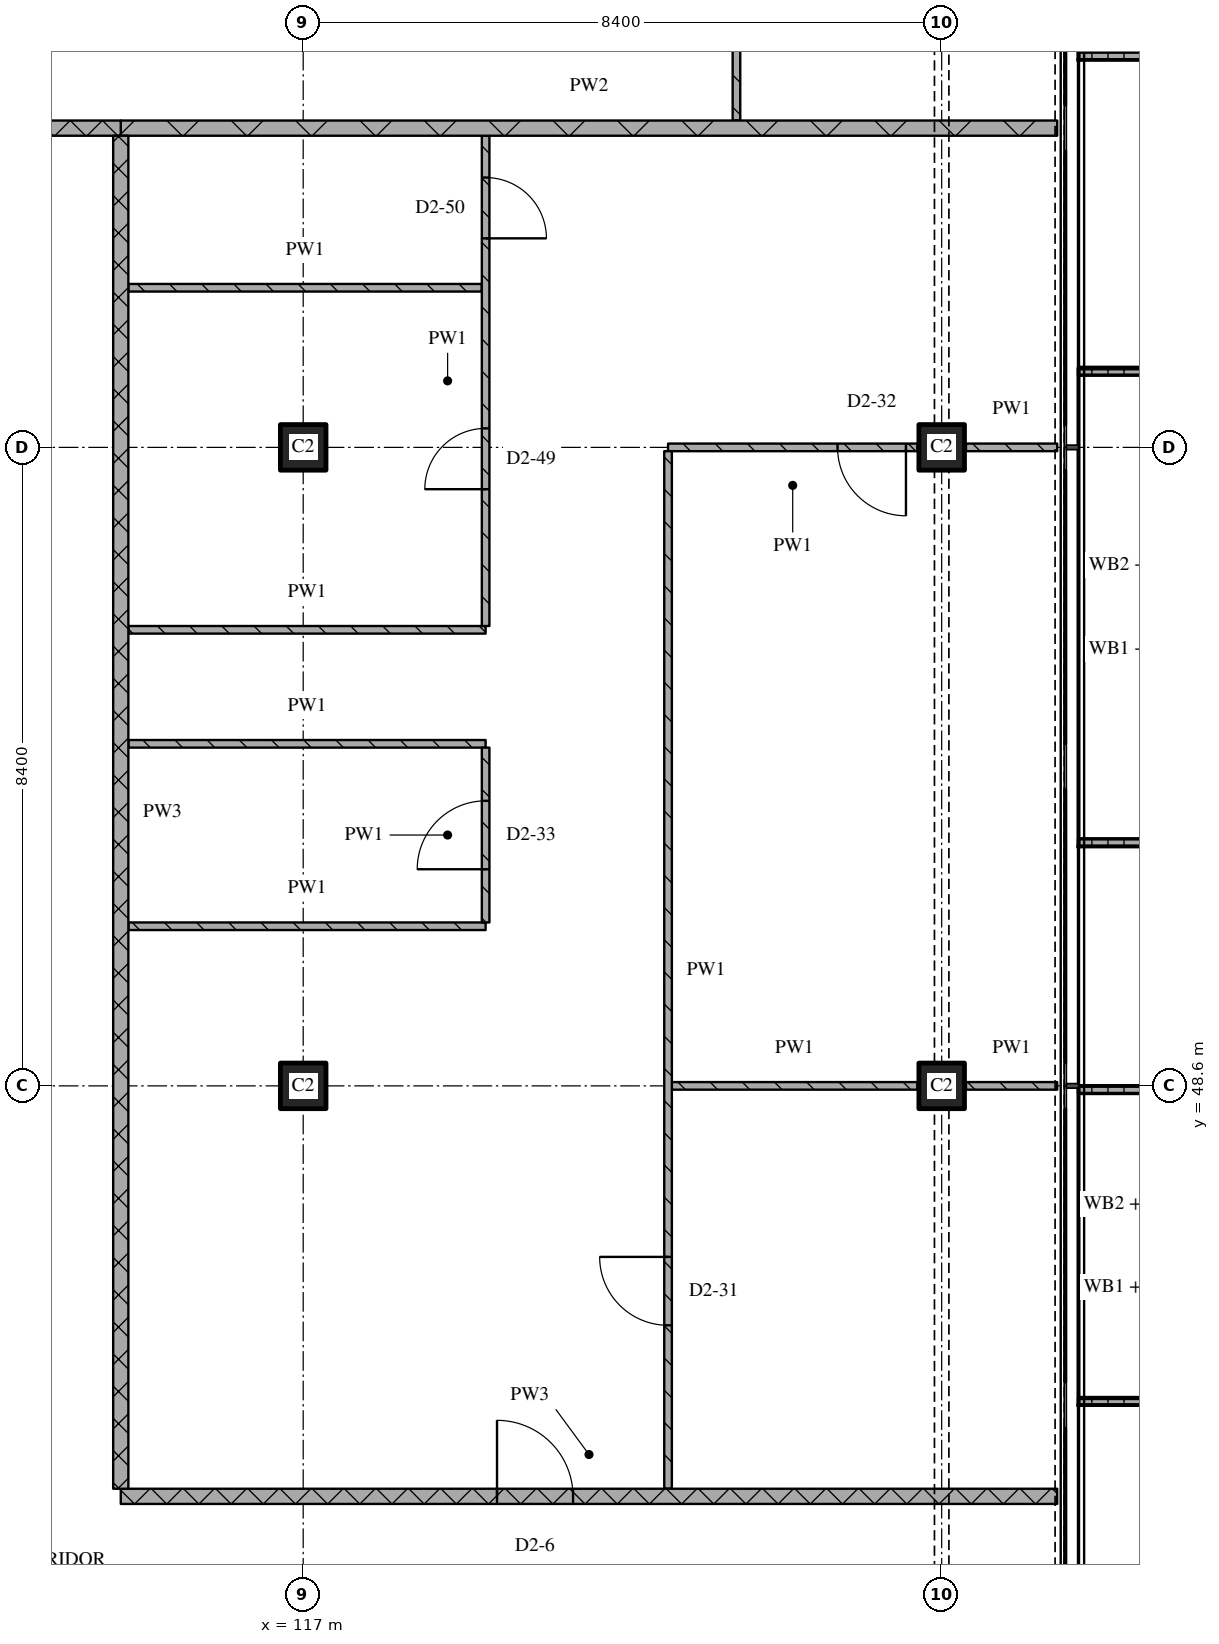
"""IFC4 building model, lengths in metres.
Left out: names, types, materials, properties, quantities, classifications, styles, units other than length and angle.
Written with IfcOpenShell. Run it as: python <this file> out.ifc"""

import sys

from ifc_helpers import new_model, si_unit, direction, frame, frame_2d, origin, origin_2d, place, context, subcontext, project, spatial, polyline, rectangle, outline, extrude, element, fill, save


model = new_model("IFC4")
c1 = context("Model", 3, precision=1e-05, world=origin(), true_north=direction((0.0, 1.0)))
c2 = subcontext(c1, "Body", "Model", "MODEL_VIEW")
j1 = project(units=[si_unit("LENGTHUNIT", "METRE"), si_unit("PLANEANGLEUNIT", "RADIAN")], contexts=[c1])
p1 = place(None, origin())
s1 = spatial("IfcSite", under=j1, at=p1, CompositionType="ELEMENT")
p2 = place(p1, origin())
s2 = spatial("IfcBuilding", under=s1, at=p2, CompositionType="ELEMENT")
p3 = place(p2, frame((0.0, 0.0, 216.3)))
s3 = spatial("IfcBuildingStorey", under=s2, at=p3, CompositionType="ELEMENT", Elevation=216.3)
for number, where, z_axis, x_axis in (
    (1, (117.0, 48.6, 0.0), (0.0, 0.0, 1.0), (1.0, 0.0, 0.0)),
    (2, (117.0, 57.0, 0.0), (0.0, 0.0, 1.0), (1.0, 0.0, 0.0)),
    (3, (125.4, 48.6, 0.0), (0.0, 0.0, 1.0), (1.0, 0.0, 0.0)),
    (4, (125.4, 57.0, 0.0), (0.0, 0.0, 1.0), (1.0, 0.0, 0.0)),
):
    element("IfcColumn", number, at=place(p3, frame(where, z_axis=z_axis, x_axis=x_axis)), inside=s3, PredefinedType="COLUMN", context=c2, shape_type="SweptSolid", body=[
        extrude(rectangle(XDim=0.6, YDim=0.6, at=origin_2d()), origin(), (0.0, 0.0, 1.0), 3.6),
    ])
p4 = place(p3, origin())
e5 = element("IfcWall", 5, at=p4, inside=s3, PredefinedType="SOLIDWALL", context=c2, shape_type="SweptSolid", body=[
    extrude(outline(polyline([(127.2, 44.4), (127.2, 44.5), (128.833, 44.5), (128.833, 48.5), (127.2, 48.5), (127.2, 48.6), (128.933, 48.6), (128.933, 44.4), (127.2, 44.4)])), origin(), (0.0, 0.0, 1.0), 1.0),
])
p5 = place(p3, origin())
e6 = element("IfcWall", 6, at=p5, inside=s3, PredefinedType="SOLIDWALL", context=c2, shape_type="SweptSolid", body=[
    extrude(outline(polyline([(127.2, 51.75), (127.2, 51.85), (128.967, 51.85), (128.967, 57.95), (127.2, 57.95), (127.2, 58.05), (129.067, 58.05), (129.067, 51.75), (127.2, 51.75)])), origin(), (0.0, 0.0, 1.0), 1.0),
])
p6 = place(p3, origin())
e7 = element("IfcWall", 7, at=p6, inside=s3, PredefinedType="SOLIDWALL", context=c2, shape_type="SweptSolid", body=[
    extrude(outline(polyline([(127.2, 62.1), (127.2, 62.2), (128.7, 62.2), (128.7, 64.4), (127.2, 64.4), (127.2, 64.5), (128.8, 64.5), (128.8, 62.1), (127.2, 62.1)])), origin(), (0.0, 0.0, 1.0), 1.0),
])
p7 = place(p3, frame((114.6, 43.2, 0.0), z_axis=(0.0, 0.0, 1.0), x_axis=(1.0, 0.0, 0.0)))
e8 = element("IfcWall", 8, at=p7, inside=s3, PredefinedType="PARTITIONING", context=c2, shape_type="SweptSolid", body=[
    extrude(rectangle(XDim=12.32, YDim=0.2, at=frame_2d((6.16, 0.0))), origin(), (0.0, 0.0, 1.0), 3.32),
])
p8 = place(p7, frame((4.95, 0.0, 0.0)))
e9 = element("IfcOpeningElement", 9, at=p8, cuts=e8, PredefinedType="OPENING", context=c2, shape_type="SweptSolid", body=[
    extrude(rectangle(XDim=1.0, YDim=2.1, at=frame_2d((0.5, 1.05))), frame((0.0, 0.11, 0.0), z_axis=(0.0, -1.0, 0.0), x_axis=(1.0, 0.0, 0.0)), (0.0, 0.0, 1.0), 0.22),
])
p9 = place(p3, frame((121.85, 48.6, 0.0), z_axis=(0.0, 0.0, 1.0), x_axis=(1.0, 0.0, 0.0)))
e10 = element("IfcWall", 10, at=p9, inside=s3, PredefinedType="PARTITIONING", context=c2, shape_type="SweptSolid", body=[
    extrude(rectangle(XDim=3.23, YDim=0.1, at=frame_2d((1.615, 0.0))), origin(), (0.0, 0.0, 1.0), 3.32),
])
p10 = place(p3, frame((125.72, 48.6, 0.0), z_axis=(0.0, 0.0, 1.0), x_axis=(1.0, 0.0, 0.0)))
e11 = element("IfcWall", 11, at=p10, inside=s3, PredefinedType="PARTITIONING", context=c2, shape_type="SweptSolid", body=[
    extrude(rectangle(XDim=1.2, YDim=0.1, at=frame_2d((0.6, 0.0))), origin(), (0.0, 0.0, 1.0), 3.32),
])
for number, where, z_axis, x_axis in (
    (12, (114.7, 50.7, 0.0), (0.0, 0.0, 1.0), (1.0, 0.0, 0.0)),
    (13, (114.7, 53.1, 0.0), (0.0, 0.0, 1.0), (1.0, 0.0, 0.0)),
    (14, (114.7, 54.6, 0.0), (0.0, 0.0, 1.0), (1.0, 0.0, 0.0)),
):
    element("IfcWall", number, at=place(p3, frame(where, z_axis=z_axis, x_axis=x_axis)), inside=s3, PredefinedType="PARTITIONING", context=c2, shape_type="SweptSolid", body=[
        extrude(rectangle(XDim=4.7, YDim=0.1, at=frame_2d((2.35, 0.0))), origin(), (0.0, 0.0, 1.0), 3.32),
    ])
p11 = place(p3, frame((125.08, 57.0, 0.0), z_axis=(0.0, 0.0, 1.0), x_axis=(-1.0, 0.0, 0.0)))
e15 = element("IfcWall", 15, at=p11, inside=s3, PredefinedType="PARTITIONING", context=c2, shape_type="SweptSolid", body=[
    extrude(rectangle(XDim=3.28, YDim=0.1, at=frame_2d((1.64, 0.0))), origin(), (0.0, 0.0, 1.0), 3.32),
])
p12 = place(p11, frame((0.15, 0.0, 0.0)))
e16 = element("IfcOpeningElement", 16, at=p12, cuts=e15, PredefinedType="OPENING", context=c2, shape_type="SweptSolid", body=[
    extrude(rectangle(XDim=0.9, YDim=2.1, at=frame_2d((0.45, 1.05))), frame((0.0, 0.06, 0.0), z_axis=(0.0, -1.0, 0.0), x_axis=(1.0, 0.0, 0.0)), (0.0, 0.0, 1.0), 0.12),
])
p13 = place(p3, frame((125.72, 57.0, 0.0), z_axis=(0.0, 0.0, 1.0), x_axis=(1.0, 0.0, 0.0)))
e17 = element("IfcWall", 17, at=p13, inside=s3, PredefinedType="PARTITIONING", context=c2, shape_type="SweptSolid", body=[
    extrude(rectangle(XDim=1.2, YDim=0.1, at=frame_2d((0.6, 0.0))), origin(), (0.0, 0.0, 1.0), 3.32),
])
p14 = place(p3, frame((114.7, 59.1, 0.0), z_axis=(0.0, 0.0, 1.0), x_axis=(1.0, 0.0, 0.0)))
e18 = element("IfcWall", 18, at=p14, inside=s3, PredefinedType="PARTITIONING", context=c2, shape_type="SweptSolid", body=[
    extrude(rectangle(XDim=4.65, YDim=0.1, at=frame_2d((2.325, 0.0))), origin(), (0.0, 0.0, 1.0), 3.32),
])
p15 = place(p3, frame((111.0, 61.2, 0.0), z_axis=(0.0, 0.0, 1.0), x_axis=(1.0, 0.0, 0.0)))
e19 = element("IfcWall", 19, at=p15, inside=s3, PredefinedType="PARTITIONING", context=c2, shape_type="SweptSolid", body=[
    extrude(rectangle(XDim=3.6, YDim=0.2, at=frame_2d((1.8, 0.0))), origin(), (0.0, 0.0, 1.0), 3.32),
])
p16 = place(p3, frame((114.6, 61.2, 0.0), z_axis=(0.0, 0.0, 1.0), x_axis=(1.0, 0.0, 0.0)))
e20 = element("IfcWall", 20, at=p16, inside=s3, PredefinedType="PARTITIONING", context=c2, shape_type="SweptSolid", body=[
    extrude(rectangle(XDim=12.32, YDim=0.2, at=frame_2d((6.16, 0.0))), origin(), (0.0, 0.0, 1.0), 3.32),
])
p17 = place(p3, frame((114.6, 61.1, 0.0), z_axis=(0.0, 0.0, 1.0), x_axis=(0.0, -1.0, 0.0)))
e21 = element("IfcWall", 21, at=p17, inside=s3, PredefinedType="PARTITIONING", context=c2, shape_type="SweptSolid", body=[
    extrude(rectangle(XDim=17.8, YDim=0.2, at=frame_2d((8.9, 0.0))), origin(), (0.0, 0.0, 1.0), 3.32),
])
p18 = place(p3, frame((119.4, 50.75, 0.0), z_axis=(0.0, 0.0, 1.0), x_axis=(0.0, 1.0, 0.0)))
e22 = element("IfcWall", 22, at=p18, inside=s3, PredefinedType="PARTITIONING", context=c2, shape_type="SweptSolid", body=[
    extrude(rectangle(XDim=2.3, YDim=0.1, at=frame_2d((1.15, 0.0))), origin(), (0.0, 0.0, 1.0), 3.32),
])
p19 = place(p18, frame((0.7, 0.0, 0.0)))
e23 = element("IfcOpeningElement", 23, at=p19, cuts=e22, PredefinedType="OPENING", context=c2, shape_type="SweptSolid", body=[
    extrude(rectangle(XDim=0.9, YDim=2.1, at=frame_2d((0.45, 1.05))), frame((0.0, 0.06, 0.0), z_axis=(0.0, -1.0, 0.0), x_axis=(1.0, 0.0, 0.0)), (0.0, 0.0, 1.0), 0.12),
])
p20 = place(p3, frame((119.4, 54.65, 0.0), z_axis=(0.0, 0.0, 1.0), x_axis=(0.0, 1.0, 0.0)))
e24 = element("IfcWall", 24, at=p20, inside=s3, PredefinedType="PARTITIONING", context=c2, shape_type="SweptSolid", body=[
    extrude(rectangle(XDim=6.45, YDim=0.1, at=frame_2d((3.225, 0.0))), origin(), (0.0, 0.0, 1.0), 3.32),
])
p21 = place(p20, frame((1.8, 0.0, 0.0)))
e25 = element("IfcOpeningElement", 25, at=p21, cuts=e24, PredefinedType="OPENING", context=c2, shape_type="SweptSolid", body=[
    extrude(rectangle(XDim=0.8, YDim=2.1, at=frame_2d((0.4, 1.05))), frame((0.0, 0.06, 0.0), z_axis=(0.0, -1.0, 0.0), x_axis=(1.0, 0.0, 0.0)), (0.0, 0.0, 1.0), 0.12),
])
p22 = place(p20, frame((5.1, 0.0, 0.0)))
e26 = element("IfcOpeningElement", 26, at=p22, cuts=e24, PredefinedType="OPENING", context=c2, shape_type="SweptSolid", body=[
    extrude(rectangle(XDim=0.8, YDim=2.1, at=frame_2d((0.4, 1.05))), frame((0.0, 0.06, 0.0), z_axis=(0.0, -1.0, 0.0), x_axis=(1.0, 0.0, 0.0)), (0.0, 0.0, 1.0), 0.12),
])
p23 = place(p3, frame((121.8, 56.95, 0.0), z_axis=(0.0, 0.0, 1.0), x_axis=(0.0, -1.0, 0.0)))
e27 = element("IfcWall", 27, at=p23, inside=s3, PredefinedType="PARTITIONING", context=c2, shape_type="SweptSolid", body=[
    extrude(rectangle(XDim=13.65, YDim=0.1, at=frame_2d((6.825, 0.0))), origin(), (0.0, 0.0, 1.0), 3.32),
])
p24 = place(p23, frame((10.6, 0.0, 0.0)))
e28 = element("IfcOpeningElement", 28, at=p24, cuts=e27, PredefinedType="OPENING", context=c2, shape_type="SweptSolid", body=[
    extrude(rectangle(XDim=0.9, YDim=2.1, at=frame_2d((0.45, 1.05))), frame((0.0, 0.06, 0.0), z_axis=(0.0, -1.0, 0.0), x_axis=(1.0, 0.0, 0.0)), (0.0, 0.0, 1.0), 0.12),
])
p25 = place(p3, frame((122.7, 69.55, 0.0), z_axis=(0.0, 0.0, 1.0), x_axis=(0.0, -1.0, 0.0)))
e29 = element("IfcWall", 29, at=p25, inside=s3, PredefinedType="PARTITIONING", context=c2, shape_type="SweptSolid", body=[
    extrude(rectangle(XDim=8.25, YDim=0.1, at=frame_2d((4.125, 0.0))), origin(), (0.0, 0.0, 1.0), 3.32),
])
p26 = place(p8, origin())
e30 = element("IfcDoor", 30, at=p26, inside=s3, OperationType="SINGLE_SWING_LEFT", PredefinedType="DOOR", context=c2, shape_type="SweptSolid", body=[
    extrude(rectangle(XDim=1.0, YDim=2.1, at=frame_2d((0.5, 1.05))), frame((0.0, 0.025, 0.0), z_axis=(0.0, -1.0, 0.0), x_axis=(1.0, 0.0, 0.0)), (0.0, 0.0, 1.0), 0.05),
])
fill(e9, e30)
p27 = place(p12, origin())
e31 = element("IfcDoor", 31, at=p27, inside=s3, OperationType="SINGLE_SWING_LEFT", PredefinedType="DOOR", context=c2, shape_type="SweptSolid", body=[
    extrude(rectangle(XDim=0.9, YDim=2.1, at=frame_2d((0.45, 1.05))), frame((0.0, 0.025, 0.0), z_axis=(0.0, -1.0, 0.0), x_axis=(1.0, 0.0, 0.0)), (0.0, 0.0, 1.0), 0.05),
])
fill(e16, e31)
p28 = place(p19, origin())
e32 = element("IfcDoor", 32, at=p28, inside=s3, OperationType="SINGLE_SWING_LEFT", PredefinedType="DOOR", context=c2, shape_type="SweptSolid", body=[
    extrude(rectangle(XDim=0.9, YDim=2.1, at=frame_2d((0.45, 1.05))), frame((0.0, 0.025, 0.0), z_axis=(0.0, -1.0, 0.0), x_axis=(1.0, 0.0, 0.0)), (0.0, 0.0, 1.0), 0.05),
])
fill(e23, e32)
p29 = place(p21, origin())
e33 = element("IfcDoor", 33, at=p29, inside=s3, OperationType="SINGLE_SWING_LEFT", PredefinedType="DOOR", context=c2, shape_type="SweptSolid", body=[
    extrude(rectangle(XDim=0.8, YDim=2.1, at=frame_2d((0.4, 1.05))), frame((0.0, 0.025, 0.0), z_axis=(0.0, -1.0, 0.0), x_axis=(1.0, 0.0, 0.0)), (0.0, 0.0, 1.0), 0.05),
])
fill(e25, e33)
p30 = place(p22, origin())
e34 = element("IfcDoor", 34, at=p30, inside=s3, OperationType="SINGLE_SWING_RIGHT", PredefinedType="DOOR", context=c2, shape_type="SweptSolid", body=[
    extrude(rectangle(XDim=0.8, YDim=2.1, at=frame_2d((0.4, 1.05))), frame((0.0, 0.025, 0.0), z_axis=(0.0, -1.0, 0.0), x_axis=(1.0, 0.0, 0.0)), (0.0, 0.0, 1.0), 0.05),
])
fill(e26, e34)
p31 = place(p24, origin())
e35 = element("IfcDoor", 35, at=p31, inside=s3, OperationType="SINGLE_SWING_RIGHT", PredefinedType="DOOR", context=c2, shape_type="SweptSolid", body=[
    extrude(rectangle(XDim=0.9, YDim=2.1, at=frame_2d((0.45, 1.05))), frame((0.0, 0.025, 0.0), z_axis=(0.0, -1.0, 0.0), x_axis=(1.0, 0.0, 0.0)), (0.0, 0.0, 1.0), 0.05),
])
fill(e28, e35)
save(model, sys.argv[1])
